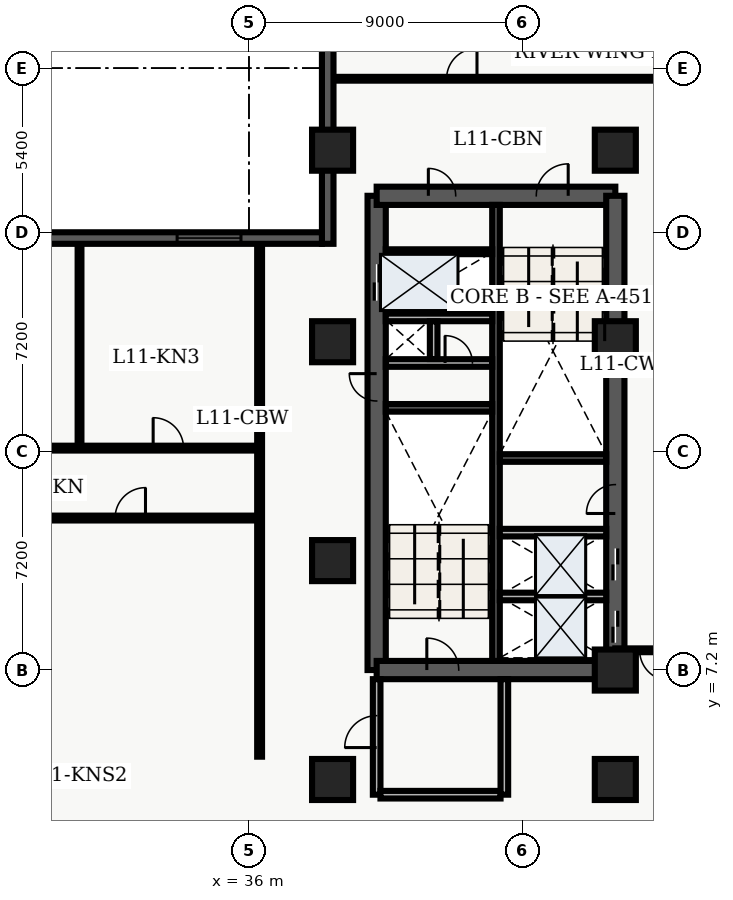
"""IFC4 building model, lengths in metres.
Left out: names, types, materials, properties, quantities, classifications, styles, units other than length and angle.
Written with IfcOpenShell. Run it as: python <this file> out.ifc"""

import sys

from ifc_helpers import new_model, entity, si_unit, converted_unit, direction, frame, origin_with_axes, origin_2d_with_axis, place, context, subcontext, project, spatial, polyline, rectangle, outline, extrude, element, fill, save


model = new_model("IFC4")
c1 = context("Model", 3, precision=1e-05, world=origin_with_axes(), true_north=direction((0.0, 1.0)))
c2 = subcontext(c1, "Body", "Model", "MODEL_VIEW")
j1 = project(units=[si_unit("LENGTHUNIT", "METRE"), converted_unit("PLANEANGLEUNIT", "DEGREE", entity("IfcPlaneAngleMeasure", 0.017), si_unit("PLANEANGLEUNIT", "RADIAN"), dimensions=[0, 0, 0, 0, 0, 0, 0])], contexts=[c1])
p1 = place(None, origin_with_axes())
s1 = spatial("IfcSite", under=j1, at=p1, CompositionType="ELEMENT")
p2 = place(p1, origin_with_axes())
s2 = spatial("IfcBuilding", under=s1, at=p2, CompositionType="ELEMENT")
p3 = place(p2, frame((0.0, 0.0, 48.3), z_axis=(0.0, 0.0, 1.0), x_axis=(1.0, 0.0, 0.0)))
s3 = spatial("IfcBuildingStorey", under=s2, at=p3, CompositionType="ELEMENT", Elevation=48.3)
p4 = place(p3, frame((40.2, 7.2, 0.0), z_axis=(0.0, 0.0, 1.0), x_axis=(0.0, 1.0, 0.0)))
e1 = element("IfcWall", 1, at=p4, inside=s3, PredefinedType="SHEAR", context=c2, shape_type="SweptSolid", body=[
    extrude(outline(polyline([(0.0, -0.3), (15.6, -0.3), (15.6, 0.3), (0.0, 0.3), (0.0, -0.3)])), origin_with_axes(), (0.0, 0.0, 1.0), 3.66),
])
p5 = place(p4, frame((12.75, 0.0, 0.0), z_axis=(0.0, 0.0, 1.0), x_axis=(1.0, 0.0, 0.0)))
e2 = element("IfcOpeningElement", 2, at=p5, cuts=e1, PredefinedType="OPENING", context=c2, shape_type="SweptSolid", body=[
    extrude(rectangle(XDim=1.2, YDim=0.62, at=origin_2d_with_axis()), origin_with_axes(), (0.0, 0.0, 1.0), 2.15),
])
p6 = place(p4, frame((9.3, 0.0, 0.0), z_axis=(0.0, 0.0, 1.0), x_axis=(1.0, 0.0, 0.0)))
e3 = element("IfcOpeningElement", 3, at=p6, cuts=e1, PredefinedType="OPENING", context=c2, shape_type="SweptSolid", body=[
    extrude(rectangle(XDim=0.9, YDim=0.62, at=origin_2d_with_axis()), origin_with_axes(), (0.0, 0.0, 1.0), 2.15),
])
p7 = place(p3, frame((40.2, 7.2, 0.0), z_axis=(0.0, 0.0, 1.0), x_axis=(1.0, 0.0, 0.0)))
e4 = element("IfcWall", 4, at=p7, inside=s3, PredefinedType="SHEAR", context=c2, shape_type="SweptSolid", body=[
    extrude(outline(polyline([(0.0, -0.3), (7.85, -0.3), (7.85, 0.3), (0.0, 0.3), (0.0, -0.3)])), origin_with_axes(), (0.0, 0.0, 1.0), 3.66),
])
p8 = place(p7, frame((2.175, 0.0, 0.0), z_axis=(0.0, 0.0, 1.0), x_axis=(1.0, 0.0, 0.0)))
e5 = element("IfcOpeningElement", 5, at=p8, cuts=e4, PredefinedType="OPENING", context=c2, shape_type="SweptSolid", body=[
    extrude(rectangle(XDim=1.05, YDim=0.62, at=origin_2d_with_axis()), origin_with_axes(), (0.0, 0.0, 1.0), 2.15),
])
p9 = place(p3, frame((40.2, 22.8, 0.0), z_axis=(0.0, 0.0, 1.0), x_axis=(1.0, 0.0, 0.0)))
e6 = element("IfcWall", 6, at=p9, inside=s3, PredefinedType="SHEAR", context=c2, shape_type="SweptSolid", body=[
    extrude(outline(polyline([(0.0, -0.3), (7.85, -0.3), (7.85, 0.3), (0.0, 0.3), (0.0, -0.3)])), origin_with_axes(), (0.0, 0.0, 1.0), 3.66),
])
p10 = place(p9, frame((5.775, 0.0, 0.0), z_axis=(0.0, 0.0, 1.0), x_axis=(1.0, 0.0, 0.0)))
e7 = element("IfcOpeningElement", 7, at=p10, cuts=e6, PredefinedType="OPENING", context=c2, shape_type="SweptSolid", body=[
    extrude(rectangle(XDim=1.05, YDim=0.62, at=origin_2d_with_axis()), origin_with_axes(), (0.0, 0.0, 1.0), 2.15),
])
p11 = place(p9, frame((2.15, 0.0, 0.0), z_axis=(0.0, 0.0, 1.0), x_axis=(1.0, 0.0, 0.0)))
e8 = element("IfcOpeningElement", 8, at=p11, cuts=e6, PredefinedType="OPENING", context=c2, shape_type="SweptSolid", body=[
    extrude(rectangle(XDim=0.9, YDim=0.62, at=origin_2d_with_axis()), origin_with_axes(), (0.0, 0.0, 1.0), 2.15),
])
p12 = place(p3, frame((48.05, 7.2, 0.0), z_axis=(0.0, 0.0, 1.0), x_axis=(0.0, 1.0, 0.0)))
e9 = element("IfcWall", 9, at=p12, inside=s3, PredefinedType="SHEAR", context=c2, shape_type="SweptSolid", body=[
    extrude(outline(polyline([(0.0, -0.3), (15.6, -0.3), (15.6, 0.3), (0.0, 0.3), (0.0, -0.3)])), origin_with_axes(), (0.0, 0.0, 1.0), 3.66),
])
p13 = place(p12, frame((1.425, 0.0, 0.0), z_axis=(0.0, 0.0, 1.0), x_axis=(1.0, 0.0, 0.0)))
e10 = element("IfcOpeningElement", 10, at=p13, cuts=e9, PredefinedType="OPENING", context=c2, shape_type="SweptSolid", body=[
    extrude(rectangle(XDim=1.05, YDim=0.62, at=origin_2d_with_axis()), origin_with_axes(), (0.0, 0.0, 1.0), 2.15),
])
p14 = place(p12, frame((3.475, 0.0, 0.0), z_axis=(0.0, 0.0, 1.0), x_axis=(1.0, 0.0, 0.0)))
e11 = element("IfcOpeningElement", 11, at=p14, cuts=e9, PredefinedType="OPENING", context=c2, shape_type="SweptSolid", body=[
    extrude(rectangle(XDim=1.05, YDim=0.62, at=origin_2d_with_axis()), origin_with_axes(), (0.0, 0.0, 1.0), 2.15),
])
p15 = place(p12, frame((5.625, 0.0, 0.0), z_axis=(0.0, 0.0, 1.0), x_axis=(1.0, 0.0, 0.0)))
e12 = element("IfcOpeningElement", 12, at=p15, cuts=e9, PredefinedType="OPENING", context=c2, shape_type="SweptSolid", body=[
    extrude(rectangle(XDim=0.95, YDim=0.62, at=origin_2d_with_axis()), origin_with_axes(), (0.0, 0.0, 1.0), 2.15),
])
p16 = place(p3, frame((44.125, 7.5, 0.0), z_axis=(0.0, 0.0, 1.0), x_axis=(0.0, 1.0, 0.0)))
e13 = element("IfcWall", 13, at=p16, inside=s3, PredefinedType="SHEAR", context=c2, shape_type="SweptSolid", body=[
    extrude(outline(polyline([(0.0, -0.125), (15.0, -0.125), (15.0, 0.125), (0.0, 0.125), (0.0, -0.125)])), origin_with_axes(), (0.0, 0.0, 1.0), 3.66),
])
for number, where, z_axis, x_axis in (
    (14, (40.5, 15.825, 0.0), (0.0, 0.0, 1.0), (1.0, 0.0, 0.0)),
    (15, (44.25, 14.175, 0.0), (0.0, 0.0, 1.0), (1.0, 0.0, 0.0)),
):
    element("IfcWall", number, at=place(p3, frame(where, z_axis=z_axis, x_axis=x_axis)), inside=s3, PredefinedType="SHEAR", context=c2, shape_type="SweptSolid", body=[
        extrude(outline(polyline([(0.0, -0.125), (3.5, -0.125), (3.5, 0.125), (0.0, 0.125), (0.0, -0.125)])), origin_with_axes(), (0.0, 0.0, 1.0), 3.66),
    ])
p17 = place(p3, frame((40.5, 17.3, 0.0), z_axis=(0.0, 0.0, 1.0), x_axis=(1.0, 0.0, 0.0)))
e16 = element("IfcWall", 16, at=p17, inside=s3, PredefinedType="SOLIDWALL", context=c2, shape_type="SweptSolid", body=[
    extrude(outline(polyline([(0.0, -0.125), (3.5, -0.125), (3.5, 0.125), (0.0, 0.125), (0.0, -0.125)])), origin_with_axes(), (0.0, 0.0, 1.0), 2.7),
])
p18 = place(p17, frame((2.4, 0.0, 0.0), z_axis=(0.0, 0.0, 1.0), x_axis=(1.0, 0.0, 0.0)))
e17 = element("IfcOpeningElement", 17, at=p18, cuts=e16, PredefinedType="OPENING", context=c2, shape_type="SweptSolid", body=[
    extrude(rectangle(XDim=0.9, YDim=0.27, at=origin_2d_with_axis()), origin_with_axes(), (0.0, 0.0, 1.0), 2.15),
])
p19 = place(p3, frame((40.5, 18.8, 0.0), z_axis=(0.0, 0.0, 1.0), x_axis=(1.0, 0.0, 0.0)))
e18 = element("IfcWall", 18, at=p19, inside=s3, PredefinedType="SOLIDWALL", context=c2, shape_type="SweptSolid", body=[
    extrude(outline(polyline([(0.0, -0.125), (3.5, -0.125), (3.5, 0.125), (0.0, 0.125), (0.0, -0.125)])), origin_with_axes(), (0.0, 0.0, 1.0), 2.7),
])
p20 = place(p3, frame((42.075, 17.43, 0.0), z_axis=(0.0, 0.0, 1.0), x_axis=(0.0, 1.0, 0.0)))
e19 = element("IfcWall", 19, at=p20, inside=s3, PredefinedType="SOLIDWALL", context=c2, shape_type="SweptSolid", body=[
    extrude(outline(polyline([(0.0, -0.125), (1.24, -0.125), (1.24, 0.125), (0.0, 0.125), (0.0, -0.125)])), origin_with_axes(), (0.0, 0.0, 1.0), 2.7),
])
p21 = place(p3, frame((40.2, 3.1, 0.0), z_axis=(0.0, 0.0, 1.0), x_axis=(0.0, 1.0, 0.0)))
e20 = element("IfcWall", 20, at=p21, inside=s3, PredefinedType="SOLIDWALL", context=c2, shape_type="SweptSolid", body=[
    extrude(outline(polyline([(0.0, -0.125), (3.8, -0.125), (3.8, 0.125), (0.0, 0.125), (0.0, -0.125)])), origin_with_axes(), (0.0, 0.0, 1.0), 2.7),
])
p22 = place(p21, frame((2.075, 0.0, 0.0), z_axis=(0.0, 0.0, 1.0), x_axis=(1.0, 0.0, 0.0)))
e21 = element("IfcOpeningElement", 21, at=p22, cuts=e20, PredefinedType="OPENING", context=c2, shape_type="SweptSolid", body=[
    extrude(rectangle(XDim=1.05, YDim=0.27, at=origin_2d_with_axis()), origin_with_axes(), (0.0, 0.0, 1.0), 2.15),
])
p23 = place(p3, frame((40.325, 3.1, 0.0), z_axis=(0.0, 0.0, 1.0), x_axis=(1.0, 0.0, 0.0)))
e22 = element("IfcWall", 22, at=p23, inside=s3, PredefinedType="SOLIDWALL", context=c2, shape_type="SweptSolid", body=[
    extrude(outline(polyline([(0.0, -0.125), (3.95, -0.125), (3.95, 0.125), (0.0, 0.125), (0.0, -0.125)])), origin_with_axes(), (0.0, 0.0, 1.0), 2.7),
])
p24 = place(p3, frame((44.4, 3.1, 0.0), z_axis=(0.0, 0.0, 1.0), x_axis=(0.0, 1.0, 0.0)))
e23 = element("IfcWall", 23, at=p24, inside=s3, PredefinedType="SOLIDWALL", context=c2, shape_type="SweptSolid", body=[
    extrude(outline(polyline([(0.0, -0.125), (3.8, -0.125), (3.8, 0.125), (0.0, 0.125), (0.0, -0.125)])), origin_with_axes(), (0.0, 0.0, 1.0), 2.7),
])
for number, where, z_axis, x_axis in (
    (24, (38.75, 3.6, 0.0), (0.0, 0.0, 1.0), (1.0, 0.0, 0.0)),
    (25, (38.75, 10.8, 0.0), (0.0, 0.0, 1.0), (1.0, 0.0, 0.0)),
    (26, (38.75, 18.0, 0.0), (0.0, 0.0, 1.0), (1.0, 0.0, 0.0)),
    (27, (38.75, 24.3, 0.0), (0.0, 0.0, 1.0), (1.0, 0.0, 0.0)),
    (28, (48.05, 3.6, 0.0), (0.0, 0.0, 1.0), (1.0, 0.0, 0.0)),
    (29, (48.05, 7.2, 0.0), (0.0, 0.0, 1.0), (1.0, 0.0, 0.0)),
    (30, (48.05, 18.0, 0.0), (0.0, 0.0, 1.0), (1.0, 0.0, 0.0)),
    (31, (48.05, 24.3, 0.0), (0.0, 0.0, 1.0), (1.0, 0.0, 0.0)),
):
    element("IfcColumn", number, at=place(p3, frame(where, z_axis=z_axis, x_axis=x_axis)), inside=s3, PredefinedType="COLUMN", context=c2, shape_type="SweptSolid", body=[
        extrude(rectangle(XDim=1.35, YDim=1.35, at=origin_2d_with_axis()), origin_with_axes(), (0.0, 0.0, 1.0), 3.9),
    ])
p25 = place(p3, frame((40.5, 20.96, 0.0), z_axis=(0.0, 0.0, 1.0), x_axis=(1.0, 0.0, 0.0)))
e32 = element("IfcWall", 32, at=p25, inside=s3, PredefinedType="PARTITIONING", context=c2, shape_type="SweptSolid", body=[
    extrude(outline(polyline([(0.0, -0.08), (3.5, -0.08), (3.5, 0.08), (0.0, 0.08), (0.0, -0.08)])), origin_with_axes(), (0.0, 0.0, 1.0), 2.7),
])
for number, where, z_axis, x_axis in (
    (33, (44.25, 9.62, 0.0), (0.0, 0.0, 1.0), (1.0, 0.0, 0.0)),
    (34, (44.25, 11.72, 0.0), (0.0, 0.0, 1.0), (1.0, 0.0, 0.0)),
):
    element("IfcWall", number, at=place(p3, frame(where, z_axis=z_axis, x_axis=x_axis)), inside=s3, PredefinedType="SOLIDWALL", context=c2, shape_type="SweptSolid", body=[
        extrude(outline(polyline([(0.0, -0.125), (3.5, -0.125), (3.5, 0.125), (0.0, 0.125), (0.0, -0.125)])), origin_with_axes(), (0.0, 0.0, 1.0), 2.7),
    ])
p26 = place(p3, frame((21.15, 12.2, 0.0), z_axis=(0.0, 0.0, 1.0), x_axis=(1.0, 0.0, 0.0)))
e35 = element("IfcWall", 35, at=p26, inside=s3, PredefinedType="PARTITIONING", context=c2, shape_type="SweptSolid", body=[
    extrude(outline(polyline([(0.0, -0.08), (15.2, -0.08), (15.2, 0.08), (0.0, 0.08), (0.0, -0.08)])), origin_with_axes(), (0.0, 0.0, 1.0), 2.7),
])
p27 = place(p26, frame((3.477, 0.0, 0.0), z_axis=(0.0, 0.0, 1.0), x_axis=(1.0, 0.0, 0.0)))
e36 = element("IfcOpeningElement", 36, at=p27, cuts=e35, PredefinedType="OPENING", context=c2, shape_type="SweptSolid", body=[
    extrude(rectangle(XDim=1.0, YDim=0.18, at=origin_2d_with_axis()), origin_with_axes(), (0.0, 0.0, 1.0), 2.15),
])
p28 = place(p26, frame((10.947, 0.0, 0.0), z_axis=(0.0, 0.0, 1.0), x_axis=(1.0, 0.0, 0.0)))
e37 = element("IfcOpeningElement", 37, at=p28, cuts=e35, PredefinedType="OPENING", context=c2, shape_type="SweptSolid", body=[
    extrude(rectangle(XDim=1.0, YDim=0.18, at=origin_2d_with_axis()), origin_with_axes(), (0.0, 0.0, 1.0), 2.15),
])
p29 = place(p3, frame((21.15, 14.5, 0.0), z_axis=(0.0, 0.0, 1.0), x_axis=(1.0, 0.0, 0.0)))
e38 = element("IfcWall", 38, at=p29, inside=s3, PredefinedType="PARTITIONING", context=c2, shape_type="SweptSolid", body=[
    extrude(outline(polyline([(0.0, -0.08), (15.2, -0.08), (15.2, 0.08), (0.0, 0.08), (0.0, -0.08)])), origin_with_axes(), (0.0, 0.0, 1.0), 2.7),
])
p30 = place(p29, frame((2.303, 0.0, 0.0), z_axis=(0.0, 0.0, 1.0), x_axis=(1.0, 0.0, 0.0)))
e39 = element("IfcOpeningElement", 39, at=p30, cuts=e38, PredefinedType="OPENING", context=c2, shape_type="SweptSolid", body=[
    extrude(rectangle(XDim=1.0, YDim=0.18, at=origin_2d_with_axis()), origin_with_axes(), (0.0, 0.0, 1.0), 2.15),
])
p31 = place(p29, frame((6.851, 0.0, 0.0), z_axis=(0.0, 0.0, 1.0), x_axis=(1.0, 0.0, 0.0)))
e40 = element("IfcOpeningElement", 40, at=p31, cuts=e38, PredefinedType="OPENING", context=c2, shape_type="SweptSolid", body=[
    extrude(rectangle(XDim=1.2, YDim=0.18, at=origin_2d_with_axis()), origin_with_axes(), (0.0, 0.0, 1.0), 2.2),
])
p32 = place(p29, frame((12.198, 0.0, 0.0), z_axis=(0.0, 0.0, 1.0), x_axis=(1.0, 0.0, 0.0)))
e41 = element("IfcOpeningElement", 41, at=p32, cuts=e38, PredefinedType="OPENING", context=c2, shape_type="SweptSolid", body=[
    extrude(rectangle(XDim=1.0, YDim=0.18, at=origin_2d_with_axis()), origin_with_axes(), (0.0, 0.0, 1.0), 2.15),
])
p33 = place(p3, frame((36.35, 4.35, 0.0), z_axis=(0.0, 0.0, 1.0), x_axis=(0.0, 1.0, 0.0)))
e42 = element("IfcWall", 42, at=p33, inside=s3, PredefinedType="PARTITIONING", context=c2, shape_type="SweptSolid", body=[
    extrude(outline(polyline([(0.0, -0.08), (16.95, -0.08), (16.95, 0.08), (0.0, 0.08), (0.0, -0.08)])), origin_with_axes(), (0.0, 0.0, 1.0), 2.7),
])
p34 = place(p3, frame((30.427, 14.62, 0.0), z_axis=(0.0, 0.0, 1.0), x_axis=(0.0, 1.0, 0.0)))
e43 = element("IfcWall", 43, at=p34, inside=s3, PredefinedType="PARTITIONING", context=c2, shape_type="SweptSolid", body=[
    extrude(outline(polyline([(0.0, -0.062), (6.605, -0.062), (6.605, 0.062), (0.0, 0.062), (0.0, -0.062)])), origin_with_axes(), (0.0, 0.0, 1.0), 2.7),
])
p35 = place(p3, frame((59.64, 7.85, 0.0), z_axis=(0.0, 0.0, 1.0), x_axis=(-1.0, 0.0, 0.0)))
e44 = element("IfcWall", 44, at=p35, inside=s3, PredefinedType="PARTITIONING", context=c2, shape_type="SweptSolid", body=[
    extrude(outline(polyline([(0.0, -0.062), (11.59, -0.062), (11.59, 0.062), (0.0, 0.062), (0.0, -0.062)])), origin_with_axes(), (0.0, 0.0, 1.0), 2.7),
])
p36 = place(p35, frame((10.29, 0.0, 0.0), z_axis=(0.0, 0.0, 1.0), x_axis=(1.0, 0.0, 0.0)))
e45 = element("IfcOpeningElement", 45, at=p36, cuts=e44, PredefinedType="OPENING", context=c2, shape_type="SweptSolid", body=[
    extrude(rectangle(XDim=1.0, YDim=0.145, at=origin_2d_with_axis()), origin_with_axes(), (0.0, 0.0, 1.0), 2.15),
])
p37 = place(p3, frame((38.76, 26.65, 0.0), z_axis=(0.0, 0.0, 1.0), x_axis=(1.0, 0.0, 0.0)))
e46 = element("IfcWall", 46, at=p37, inside=s3, PredefinedType="PARTITIONING", context=c2, shape_type="SweptSolid", body=[
    extrude(outline(polyline([(0.0, -0.062), (20.88, -0.062), (20.88, 0.062), (0.0, 0.062), (0.0, -0.062)])), origin_with_axes(), (0.0, 0.0, 1.0), 2.7),
])
p38 = place(p37, frame((4.24, 0.0, 0.0), z_axis=(0.0, 0.0, 1.0), x_axis=(1.0, 0.0, 0.0)))
e47 = element("IfcOpeningElement", 47, at=p38, cuts=e46, PredefinedType="OPENING", context=c2, shape_type="SweptSolid", body=[
    extrude(rectangle(XDim=1.0, YDim=0.145, at=origin_2d_with_axis()), origin_with_axes(), (0.0, 0.0, 1.0), 2.15),
])
p39 = place(p3, frame((38.59, 21.22, 0.0), z_axis=(0.0, 0.0, 1.0), x_axis=(0.0, 1.0, 0.0)))
e48 = element("IfcWall", 48, at=p39, inside=s3, PredefinedType="SOLIDWALL", context=c2, shape_type="SweptSolid", body=[
    extrude(outline(polyline([(0.0, -0.19), (7.58, -0.19), (7.58, 0.19), (0.0, 0.19), (0.0, -0.19)])), origin_with_axes(), (0.0, 0.0, 1.0), 3.66),
])
p40 = place(p3, frame((21.22, 21.41, 0.0), z_axis=(0.0, 0.0, 1.0), x_axis=(1.0, 0.0, 0.0)))
e49 = element("IfcWall", 49, at=p40, inside=s3, PredefinedType="SOLIDWALL", context=c2, shape_type="SweptSolid", body=[
    extrude(outline(polyline([(0.0, -0.19), (17.18, -0.19), (17.18, 0.19), (0.0, 0.19), (0.0, -0.19)])), origin_with_axes(), (0.0, 0.0, 1.0), 3.66),
])
p41 = place(p40, frame((2.413, 0.0, 0.45), z_axis=(0.0, 0.0, 1.0), x_axis=(1.0, 0.0, 0.0)))
e50 = element("IfcOpeningElement", 50, at=p41, cuts=e49, PredefinedType="OPENING", context=c2, shape_type="SweptSolid", body=[
    extrude(rectangle(XDim=2.1, YDim=0.4, at=origin_2d_with_axis()), origin_with_axes(), (0.0, 0.0, 1.0), 2.2),
])
p42 = place(p40, frame((13.467, 0.0, 0.45), z_axis=(0.0, 0.0, 1.0), x_axis=(1.0, 0.0, 0.0)))
e51 = element("IfcOpeningElement", 51, at=p42, cuts=e49, PredefinedType="OPENING", context=c2, shape_type="SweptSolid", body=[
    extrude(rectangle(XDim=2.1, YDim=0.4, at=origin_2d_with_axis()), origin_with_axes(), (0.0, 0.0, 1.0), 2.2),
])
p43 = place(p12, frame((1.425, 0.0, 0.0), z_axis=(0.0, 0.0, 1.0), x_axis=(1.0, 0.0, 0.0)))
e52 = element("IfcDoor", 52, at=p43, inside=s3, OperationType="SLIDING_TO_LEFT", PredefinedType="DOOR", context=c2, shape_type="SweptSolid", body=[
    extrude(rectangle(XDim=1.05, YDim=0.09, at=origin_2d_with_axis()), origin_with_axes(), (0.0, 0.0, 1.0), 2.15),
])
fill(e10, e52)
p44 = place(p12, frame((3.475, 0.0, 0.0), z_axis=(0.0, 0.0, 1.0), x_axis=(1.0, 0.0, 0.0)))
e53 = element("IfcDoor", 53, at=p44, inside=s3, OperationType="SLIDING_TO_RIGHT", PredefinedType="DOOR", context=c2, shape_type="SweptSolid", body=[
    extrude(rectangle(XDim=1.05, YDim=0.09, at=origin_2d_with_axis()), origin_with_axes(), (0.0, 0.0, 1.0), 2.15),
])
fill(e11, e53)
p45 = place(p4, frame((12.75, 0.0, 0.0), z_axis=(0.0, 0.0, 1.0), x_axis=(1.0, 0.0, 0.0)))
e54 = element("IfcDoor", 54, at=p45, inside=s3, OperationType="DOUBLE_DOOR_SLIDING", PredefinedType="DOOR", context=c2, shape_type="SweptSolid", body=[
    extrude(rectangle(XDim=1.2, YDim=0.09, at=origin_2d_with_axis()), origin_with_axes(), (0.0, 0.0, 1.0), 2.15),
])
fill(e2, e54)
p46 = place(p4, frame((9.3, 0.0, 0.0), z_axis=(0.0, 0.0, 1.0), x_axis=(1.0, 0.0, 0.0)))
e55 = element("IfcDoor", 55, at=p46, inside=s3, OperationType="SINGLE_SWING_RIGHT", PredefinedType="DOOR", context=c2, shape_type="SweptSolid", body=[
    extrude(rectangle(XDim=0.9, YDim=0.09, at=origin_2d_with_axis()), origin_with_axes(), (0.0, 0.0, 1.0), 2.15),
])
fill(e3, e55)
p47 = place(p17, frame((2.4, 0.0, 0.0), z_axis=(0.0, 0.0, 1.0), x_axis=(1.0, 0.0, 0.0)))
e56 = element("IfcDoor", 56, at=p47, inside=s3, OperationType="SINGLE_SWING_LEFT", PredefinedType="DOOR", context=c2, shape_type="SweptSolid", body=[
    extrude(rectangle(XDim=0.9, YDim=0.09, at=origin_2d_with_axis()), origin_with_axes(), (0.0, 0.0, 1.0), 2.15),
])
fill(e17, e56)
p48 = place(p7, frame((2.175, 0.0, 0.0), z_axis=(0.0, 0.0, 1.0), x_axis=(1.0, 0.0, 0.0)))
e57 = element("IfcDoor", 57, at=p48, inside=s3, OperationType="SINGLE_SWING_LEFT", PredefinedType="DOOR", context=c2, shape_type="SweptSolid", body=[
    extrude(rectangle(XDim=1.05, YDim=0.09, at=origin_2d_with_axis()), origin_with_axes(), (0.0, 0.0, 1.0), 2.15),
])
fill(e5, e57)
p49 = place(p9, frame((5.775, 0.0, 0.0), z_axis=(0.0, 0.0, 1.0), x_axis=(1.0, 0.0, 0.0)))
e58 = element("IfcDoor", 58, at=p49, inside=s3, OperationType="SINGLE_SWING_RIGHT", PredefinedType="DOOR", context=c2, shape_type="SweptSolid", body=[
    extrude(rectangle(XDim=1.05, YDim=0.09, at=origin_2d_with_axis()), origin_with_axes(), (0.0, 0.0, 1.0), 2.15),
])
fill(e7, e58)
p50 = place(p21, frame((2.075, 0.0, 0.0), z_axis=(0.0, 0.0, 1.0), x_axis=(1.0, 0.0, 0.0)))
e59 = element("IfcDoor", 59, at=p50, inside=s3, OperationType="SINGLE_SWING_LEFT", PredefinedType="DOOR", context=c2, shape_type="SweptSolid", body=[
    extrude(rectangle(XDim=1.05, YDim=0.09, at=origin_2d_with_axis()), origin_with_axes(), (0.0, 0.0, 1.0), 2.15),
])
fill(e21, e59)
p51 = place(p9, frame((2.15, 0.0, 0.0), z_axis=(0.0, 0.0, 1.0), x_axis=(1.0, 0.0, 0.0)))
e60 = element("IfcDoor", 60, at=p51, inside=s3, OperationType="SINGLE_SWING_LEFT", PredefinedType="DOOR", context=c2, shape_type="SweptSolid", body=[
    extrude(rectangle(XDim=0.9, YDim=0.09, at=origin_2d_with_axis()), origin_with_axes(), (0.0, 0.0, 1.0), 2.15),
])
fill(e8, e60)
p52 = place(p12, frame((5.625, 0.0, 0.0), z_axis=(0.0, 0.0, 1.0), x_axis=(1.0, 0.0, 0.0)))
e61 = element("IfcDoor", 61, at=p52, inside=s3, OperationType="SINGLE_SWING_LEFT", PredefinedType="DOOR", context=c2, shape_type="SweptSolid", body=[
    extrude(rectangle(XDim=0.95, YDim=0.09, at=origin_2d_with_axis()), origin_with_axes(), (0.0, 0.0, 1.0), 2.15),
])
fill(e12, e61)
p53 = place(p26, frame((10.947, 0.0, 0.0), z_axis=(0.0, 0.0, 1.0), x_axis=(1.0, 0.0, 0.0)))
e62 = element("IfcDoor", 62, at=p53, inside=s3, OperationType="SINGLE_SWING_RIGHT", PredefinedType="DOOR", context=c2, shape_type="SweptSolid", body=[
    extrude(rectangle(XDim=1.0, YDim=0.09, at=origin_2d_with_axis()), origin_with_axes(), (0.0, 0.0, 1.0), 2.15),
])
fill(e37, e62)
p54 = place(p29, frame((12.198, 0.0, 0.0), z_axis=(0.0, 0.0, 1.0), x_axis=(1.0, 0.0, 0.0)))
e63 = element("IfcDoor", 63, at=p54, inside=s3, OperationType="SINGLE_SWING_LEFT", PredefinedType="DOOR", context=c2, shape_type="SweptSolid", body=[
    extrude(rectangle(XDim=1.0, YDim=0.09, at=origin_2d_with_axis()), origin_with_axes(), (0.0, 0.0, 1.0), 2.15),
])
fill(e41, e63)
p55 = place(p35, frame((10.29, 0.0, 0.0), z_axis=(0.0, 0.0, 1.0), x_axis=(1.0, 0.0, 0.0)))
e64 = element("IfcDoor", 64, at=p55, inside=s3, OperationType="SINGLE_SWING_LEFT", PredefinedType="DOOR", context=c2, shape_type="SweptSolid", body=[
    extrude(rectangle(XDim=1.0, YDim=0.075, at=origin_2d_with_axis()), origin_with_axes(), (0.0, 0.0, 1.0), 2.15),
])
fill(e45, e64)
p56 = place(p37, frame((4.24, 0.0, 0.0), z_axis=(0.0, 0.0, 1.0), x_axis=(1.0, 0.0, 0.0)))
e65 = element("IfcDoor", 65, at=p56, inside=s3, OperationType="SINGLE_SWING_RIGHT", PredefinedType="DOOR", context=c2, shape_type="SweptSolid", body=[
    extrude(rectangle(XDim=1.0, YDim=0.075, at=origin_2d_with_axis()), origin_with_axes(), (0.0, 0.0, 1.0), 2.15),
])
fill(e47, e65)
p57 = place(p40, frame((13.467, 0.0, 0.45), z_axis=(0.0, 0.0, 1.0), x_axis=(1.0, 0.0, 0.0)))
e66 = element("IfcWindow", 66, at=p57, inside=s3, PredefinedType="WINDOW", context=c2, shape_type="SweptSolid", body=[
    extrude(rectangle(XDim=2.1, YDim=0.09, at=origin_2d_with_axis()), origin_with_axes(), (0.0, 0.0, 1.0), 2.2),
])
fill(e51, e66)
save(model, sys.argv[1])
